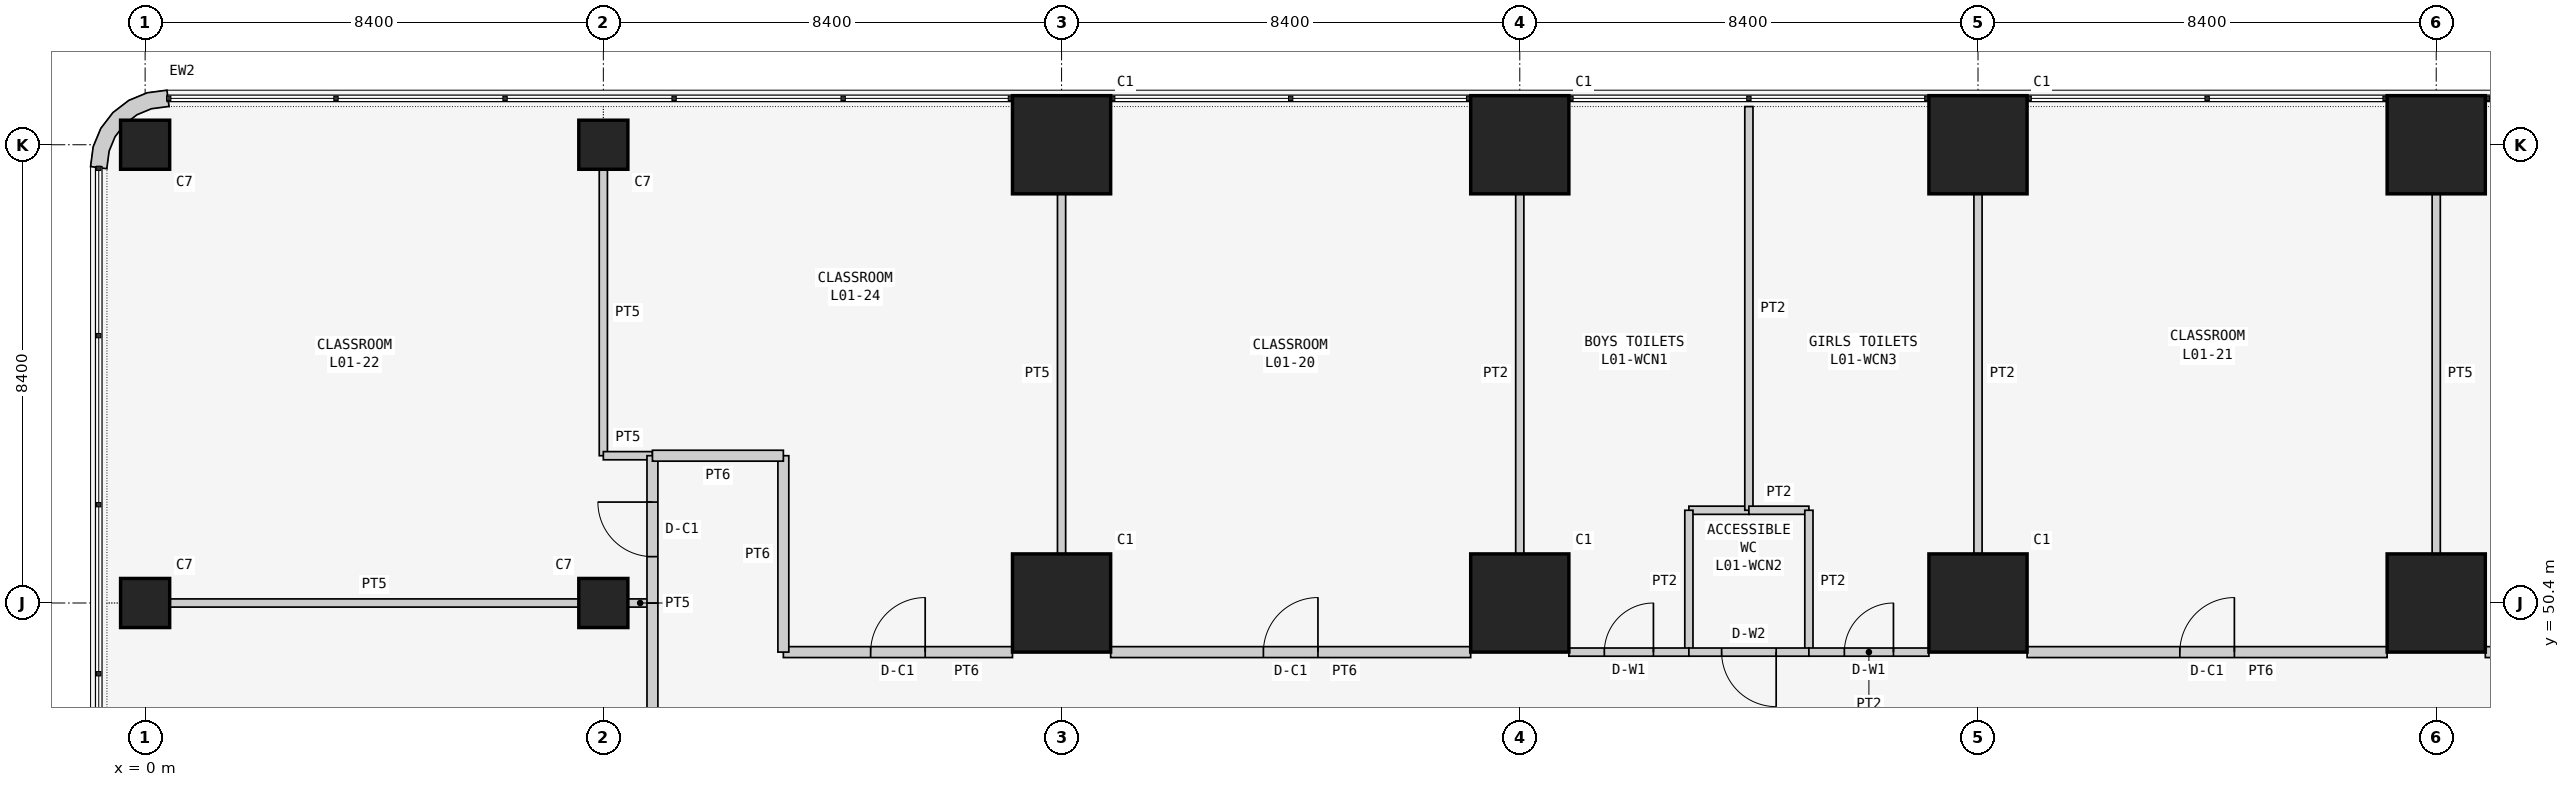
"""IFC4 building model, lengths in metres.
Left out: names, types, materials, properties, quantities, classifications, styles, units other than length and angle.
Written with IfcOpenShell. Run it as: python <this file> out.ifc"""

import sys

from ifc_helpers import new_model, si_unit, direction, frame, frame_2d, origin, origin_2d, place, context, subcontext, project, spatial, polyline, rectangle, outline, extrude, element, fill, save


model = new_model("IFC4")
c1 = context("Model", 3, precision=1e-05, world=origin(), true_north=direction((0.0, 1.0)))
c2 = subcontext(c1, "Body", "Model", "MODEL_VIEW")
j1 = project(units=[si_unit("LENGTHUNIT", "METRE"), si_unit("PLANEANGLEUNIT", "RADIAN")], contexts=[c1])
p1 = place(None, origin())
s1 = spatial("IfcSite", under=j1, at=p1, CompositionType="ELEMENT")
p2 = place(p1, origin())
s2 = spatial("IfcBuilding", under=s1, at=p2, CompositionType="ELEMENT")
p3 = place(p2, frame((0.0, 0.0, 6.0)))
s3 = spatial("IfcBuildingStorey", under=s2, at=p3, CompositionType="ELEMENT", Elevation=6.0)
for number, where, z_axis, x_axis in (
    (1, (0.0, 50.4, 0.0), (0.0, 0.0, 1.0), (1.0, 0.0, 0.0)),
    (2, (0.0, 58.8, 0.0), (0.0, 0.0, 1.0), (1.0, 0.0, 0.0)),
    (3, (8.4, 50.4, 0.0), (0.0, 0.0, 1.0), (1.0, 0.0, 0.0)),
    (4, (8.4, 58.8, 0.0), (0.0, 0.0, 1.0), (1.0, 0.0, 0.0)),
):
    element("IfcColumn", number, at=place(p3, frame(where, z_axis=z_axis, x_axis=x_axis)), inside=s3, PredefinedType="COLUMN", context=c2, shape_type="SweptSolid", body=[
        extrude(rectangle(XDim=0.9, YDim=0.9, at=origin_2d()), origin(), (0.0, 0.0, 1.0), 4.5),
    ])
for number, where, z_axis, x_axis in (
    (5, (16.8, 50.4, 0.0), (0.0, 0.0, 1.0), (1.0, 0.0, 0.0)),
    (6, (16.8, 58.8, 0.0), (0.0, 0.0, 1.0), (1.0, 0.0, 0.0)),
    (7, (25.2, 50.4, 0.0), (0.0, 0.0, 1.0), (1.0, 0.0, 0.0)),
    (8, (25.2, 58.8, 0.0), (0.0, 0.0, 1.0), (1.0, 0.0, 0.0)),
    (9, (33.6, 50.4, 0.0), (0.0, 0.0, 1.0), (1.0, 0.0, 0.0)),
    (10, (33.6, 58.8, 0.0), (0.0, 0.0, 1.0), (1.0, 0.0, 0.0)),
    (11, (42.0, 50.4, 0.0), (0.0, 0.0, 1.0), (1.0, 0.0, 0.0)),
    (12, (42.0, 58.8, 0.0), (0.0, 0.0, 1.0), (1.0, 0.0, 0.0)),
):
    element("IfcColumn", number, at=place(p3, frame(where, z_axis=z_axis, x_axis=x_axis)), inside=s3, PredefinedType="COLUMN", context=c2, shape_type="SweptSolid", body=[
        extrude(rectangle(XDim=1.8, YDim=1.8, at=origin_2d()), origin(), (0.0, 0.0, 1.0), 4.5),
    ])
p4 = place(p3, frame((0.445, 59.648, 0.0), z_axis=(0.0, 0.0, 1.0), x_axis=(-0.707106781187, 0.707106781187, 0.0)))
e13 = element("IfcWall", 13, at=p4, inside=s3, PredefinedType="SOLIDWALL", context=c2, shape_type="SweptSolid", body=[
    extrude(outline(polyline([(0.139, 1.904), (-0.101, 1.72), (-0.087, 1.706), (0.1, 1.463), (0.209, 1.198), (0.247, 0.914), (0.209, 0.63), (0.1, 0.365), (-0.087, 0.122), (-0.101, 0.108), (0.139, -0.076), (0.362, 0.214), (0.502, 0.552), (0.549, 0.914), (0.502, 1.276), (0.362, 1.614), (0.139, 1.904)])), origin(), (0.0, 0.0, 1.0), 4.3),
])
p5 = place(p3, frame((29.4, 52.1, 0.0), z_axis=(0.0, 0.0, 1.0), x_axis=(-1.0, 0.0, 0.0)))
e14 = element("IfcWall", 14, at=p5, inside=s3, PredefinedType="PARTITIONING", context=c2, shape_type="SweptSolid", body=[
    extrude(rectangle(XDim=1.1, YDim=0.15, at=frame_2d((0.55, 0.0))), origin(), (0.0, 0.0, 1.0), 4.3),
])
p6 = place(p3, frame((28.3, 52.1, 0.0), z_axis=(0.0, 0.0, 1.0), x_axis=(0.0, -1.0, 0.0)))
e15 = element("IfcWall", 15, at=p6, inside=s3, PredefinedType="PARTITIONING", context=c2, shape_type="SweptSolid", body=[
    extrude(rectangle(XDim=2.6, YDim=0.15, at=frame_2d((1.3, 0.0))), origin(), (0.0, 0.0, 1.0), 4.3),
])
p7 = place(p3, frame((29.4, 59.5, 0.0), z_axis=(0.0, 0.0, 1.0), x_axis=(0.0, -1.0, 0.0)))
e16 = element("IfcWall", 16, at=p7, inside=s3, PredefinedType="PARTITIONING", context=c2, shape_type="SweptSolid", body=[
    extrude(rectangle(XDim=7.4, YDim=0.15, at=frame_2d((3.7, 0.0))), origin(), (0.0, 0.0, 1.0), 3.688),
])
p8 = place(p3, frame((25.2, 51.3, 0.0), z_axis=(0.0, 0.0, 1.0), x_axis=(0.0, 1.0, 0.0)))
e17 = element("IfcWall", 17, at=p8, inside=s3, PredefinedType="PARTITIONING", context=c2, shape_type="SweptSolid", body=[
    extrude(rectangle(XDim=6.6, YDim=0.15, at=frame_2d((3.3, 0.0))), origin(), (0.0, 0.0, 1.0), 3.543),
])
p9 = place(p3, frame((28.3, 49.5, 0.0), z_axis=(0.0, 0.0, 1.0), x_axis=(-1.0, 0.0, 0.0)))
e18 = element("IfcWall", 18, at=p9, inside=s3, PredefinedType="PARTITIONING", context=c2, shape_type="SweptSolid", body=[
    extrude(rectangle(XDim=2.2, YDim=0.15, at=frame_2d((1.1, 0.0))), origin(), (0.0, 0.0, 1.0), 4.3),
])
p10 = place(p9, frame((0.65, 0.0, 0.0)))
e19 = element("IfcOpeningElement", 19, at=p10, cuts=e18, PredefinedType="OPENING", context=c2, shape_type="SweptSolid", body=[
    extrude(rectangle(XDim=0.9, YDim=2.1, at=frame_2d((0.45, 1.05))), frame((0.0, 0.085, 0.0), z_axis=(0.0, -1.0, 0.0), x_axis=(1.0, 0.0, 0.0)), (0.0, 0.0, 1.0), 0.17),
])
p11 = place(p3, frame((29.4, 52.1, 0.0), z_axis=(0.0, 0.0, 1.0), x_axis=(1.0, 0.0, 0.0)))
e20 = element("IfcWall", 20, at=p11, inside=s3, PredefinedType="PARTITIONING", context=c2, shape_type="SweptSolid", body=[
    extrude(rectangle(XDim=1.1, YDim=0.15, at=frame_2d((0.55, 0.0))), origin(), (0.0, 0.0, 1.0), 4.3),
])
p12 = place(p3, frame((30.5, 52.1, 0.0), z_axis=(0.0, 0.0, 1.0), x_axis=(0.0, -1.0, 0.0)))
e21 = element("IfcWall", 21, at=p12, inside=s3, PredefinedType="PARTITIONING", context=c2, shape_type="SweptSolid", body=[
    extrude(rectangle(XDim=2.6, YDim=0.15, at=frame_2d((1.3, 0.0))), origin(), (0.0, 0.0, 1.0), 4.3),
])
p13 = place(p3, frame((30.5, 49.5, 0.0), z_axis=(0.0, 0.0, 1.0), x_axis=(-1.0, 0.0, 0.0)))
e22 = element("IfcWall", 22, at=p13, inside=s3, PredefinedType="PARTITIONING", context=c2, shape_type="SweptSolid", body=[
    extrude(rectangle(XDim=2.2, YDim=0.15, at=frame_2d((1.1, 0.0))), origin(), (0.0, 0.0, 1.0), 4.3),
])
p14 = place(p13, frame((0.6, 0.0, 0.0)))
e23 = element("IfcOpeningElement", 23, at=p14, cuts=e22, PredefinedType="OPENING", context=c2, shape_type="SweptSolid", body=[
    extrude(rectangle(XDim=1.0, YDim=2.1, at=frame_2d((0.5, 1.05))), frame((0.0, 0.085, 0.0), z_axis=(0.0, -1.0, 0.0), x_axis=(1.0, 0.0, 0.0)), (0.0, 0.0, 1.0), 0.17),
])
p15 = place(p3, frame((33.6, 57.9, 0.0), z_axis=(0.0, 0.0, 1.0), x_axis=(0.0, -1.0, 0.0)))
e24 = element("IfcWall", 24, at=p15, inside=s3, PredefinedType="PARTITIONING", context=c2, shape_type="SweptSolid", body=[
    extrude(rectangle(XDim=6.6, YDim=0.15, at=frame_2d((3.3, 0.0))), origin(), (0.0, 0.0, 1.0), 3.543),
])
p16 = place(p3, frame((32.7, 49.5, 0.0), z_axis=(0.0, 0.0, 1.0), x_axis=(-1.0, 0.0, 0.0)))
e25 = element("IfcWall", 25, at=p16, inside=s3, PredefinedType="PARTITIONING", context=c2, shape_type="SweptSolid", body=[
    extrude(rectangle(XDim=2.2, YDim=0.15, at=frame_2d((1.1, 0.0))), origin(), (0.0, 0.0, 1.0), 4.3),
])
p17 = place(p16, frame((0.65, 0.0, 0.0)))
e26 = element("IfcOpeningElement", 26, at=p17, cuts=e25, PredefinedType="OPENING", context=c2, shape_type="SweptSolid", body=[
    extrude(rectangle(XDim=0.9, YDim=2.1, at=frame_2d((0.45, 1.05))), frame((0.0, 0.085, 0.0), z_axis=(0.0, -1.0, 0.0), x_axis=(1.0, 0.0, 0.0)), (0.0, 0.0, 1.0), 0.17),
])
p18 = place(p3, frame((0.45, 50.4, 0.0), z_axis=(0.0, 0.0, 1.0), x_axis=(1.0, 0.0, 0.0)))
e27 = element("IfcWall", 27, at=p18, inside=s3, PredefinedType="PARTITIONING", context=c2, shape_type="SweptSolid", body=[
    extrude(rectangle(XDim=7.5, YDim=0.15, at=frame_2d((3.75, 0.0))), origin(), (0.0, 0.0, 1.0), 3.543),
])
p19 = place(p3, frame((8.85, 50.4, 0.0), z_axis=(0.0, 0.0, 1.0), x_axis=(1.0, 0.0, 0.0)))
e28 = element("IfcWall", 28, at=p19, inside=s3, PredefinedType="PARTITIONING", context=c2, shape_type="SweptSolid", body=[
    extrude(rectangle(XDim=0.45, YDim=0.15, at=frame_2d((0.225, 0.0))), origin(), (0.0, 0.0, 1.0), 3.543),
])
p20 = place(p3, frame((9.3, 50.4, 0.0), z_axis=(0.0, 0.0, 1.0), x_axis=(0.0, -1.0, 0.0)))
e29 = element("IfcWall", 29, at=p20, inside=s3, PredefinedType="PARTITIONING", context=c2, shape_type="SweptSolid", body=[
    extrude(rectangle(XDim=7.5, YDim=0.2, at=frame_2d((3.75, 0.0))), origin(), (0.0, 0.0, 1.0), 4.3),
])
p21 = place(p20, frame((3.25, 0.0, 0.0)))
e30 = element("IfcOpeningElement", 30, at=p21, cuts=e29, PredefinedType="OPENING", context=c2, shape_type="SweptSolid", body=[
    extrude(rectangle(XDim=1.0, YDim=2.1, at=frame_2d((0.5, 1.05))), frame((0.0, 0.11, 0.0), z_axis=(0.0, -1.0, 0.0), x_axis=(1.0, 0.0, 0.0)), (0.0, 0.0, 1.0), 0.22),
])
p22 = place(p3, frame((16.8, 51.3, 0.0), z_axis=(0.0, 0.0, 1.0), x_axis=(0.0, 1.0, 0.0)))
e31 = element("IfcWall", 31, at=p22, inside=s3, PredefinedType="PARTITIONING", context=c2, shape_type="SweptSolid", body=[
    extrude(rectangle(XDim=6.6, YDim=0.15, at=frame_2d((3.3, 0.0))), origin(), (0.0, 0.0, 1.0), 3.543),
])
p23 = place(p3, frame((24.3, 49.5, 0.0), z_axis=(0.0, 0.0, 1.0), x_axis=(-1.0, 0.0, 0.0)))
e32 = element("IfcWall", 32, at=p23, inside=s3, PredefinedType="PARTITIONING", context=c2, shape_type="SweptSolid", body=[
    extrude(rectangle(XDim=6.6, YDim=0.2, at=frame_2d((3.3, 0.0))), origin(), (0.0, 0.0, 1.0), 4.3),
])
p24 = place(p23, frame((2.8, 0.0, 0.0)))
e33 = element("IfcOpeningElement", 33, at=p24, cuts=e32, PredefinedType="OPENING", context=c2, shape_type="SweptSolid", body=[
    extrude(rectangle(XDim=1.0, YDim=2.1, at=frame_2d((0.5, 1.05))), frame((0.0, 0.11, 0.0), z_axis=(0.0, -1.0, 0.0), x_axis=(1.0, 0.0, 0.0)), (0.0, 0.0, 1.0), 0.22),
])
p25 = place(p3, frame((42.0, 57.9, 0.0), z_axis=(0.0, 0.0, 1.0), x_axis=(0.0, -1.0, 0.0)))
e34 = element("IfcWall", 34, at=p25, inside=s3, PredefinedType="PARTITIONING", context=c2, shape_type="SweptSolid", body=[
    extrude(rectangle(XDim=6.6, YDim=0.15, at=frame_2d((3.3, 0.0))), origin(), (0.0, 0.0, 1.0), 3.543),
])
p26 = place(p3, frame((41.1, 49.5, 0.0), z_axis=(0.0, 0.0, 1.0), x_axis=(-1.0, 0.0, 0.0)))
e35 = element("IfcWall", 35, at=p26, inside=s3, PredefinedType="PARTITIONING", context=c2, shape_type="SweptSolid", body=[
    extrude(rectangle(XDim=6.6, YDim=0.2, at=frame_2d((3.3, 0.0))), origin(), (0.0, 0.0, 1.0), 4.3),
])
p27 = place(p26, frame((2.8, 0.0, 0.0)))
e36 = element("IfcOpeningElement", 36, at=p27, cuts=e35, PredefinedType="OPENING", context=c2, shape_type="SweptSolid", body=[
    extrude(rectangle(XDim=1.0, YDim=2.1, at=frame_2d((0.5, 1.05))), frame((0.0, 0.11, 0.0), z_axis=(0.0, -1.0, 0.0), x_axis=(1.0, 0.0, 0.0)), (0.0, 0.0, 1.0), 0.22),
])
p28 = place(p3, frame((8.4, 58.35, 0.0), z_axis=(0.0, 0.0, 1.0), x_axis=(0.0, -1.0, 0.0)))
e37 = element("IfcWall", 37, at=p28, inside=s3, PredefinedType="PARTITIONING", context=c2, shape_type="SweptSolid", body=[
    extrude(rectangle(XDim=5.25, YDim=0.15, at=frame_2d((2.625, 0.0))), origin(), (0.0, 0.0, 1.0), 3.543),
])
p29 = place(p3, frame((8.4, 53.1, 0.0), z_axis=(0.0, 0.0, 1.0), x_axis=(1.0, 0.0, 0.0)))
e38 = element("IfcWall", 38, at=p29, inside=s3, PredefinedType="PARTITIONING", context=c2, shape_type="SweptSolid", body=[
    extrude(rectangle(XDim=0.9, YDim=0.15, at=frame_2d((0.45, 0.0))), origin(), (0.0, 0.0, 1.0), 4.3),
])
p30 = place(p3, frame((9.3, 53.1, 0.0), z_axis=(0.0, 0.0, 1.0), x_axis=(0.0, -1.0, 0.0)))
e39 = element("IfcWall", 39, at=p30, inside=s3, PredefinedType="PARTITIONING", context=c2, shape_type="SweptSolid", body=[
    extrude(rectangle(XDim=2.7, YDim=0.2, at=frame_2d((1.35, 0.0))), origin(), (0.0, 0.0, 1.0), 4.3),
])
p31 = place(p30, frame((0.85, 0.0, 0.0)))
e40 = element("IfcOpeningElement", 40, at=p31, cuts=e39, PredefinedType="OPENING", context=c2, shape_type="SweptSolid", body=[
    extrude(rectangle(XDim=1.0, YDim=2.1, at=frame_2d((0.5, 1.05))), frame((0.0, 0.11, 0.0), z_axis=(0.0, -1.0, 0.0), x_axis=(1.0, 0.0, 0.0)), (0.0, 0.0, 1.0), 0.22),
])
p32 = place(p3, frame((15.9, 49.5, 0.0), z_axis=(0.0, 0.0, 1.0), x_axis=(-1.0, 0.0, 0.0)))
e41 = element("IfcWall", 41, at=p32, inside=s3, PredefinedType="PARTITIONING", context=c2, shape_type="SweptSolid", body=[
    extrude(rectangle(XDim=4.2, YDim=0.2, at=frame_2d((2.1, 0.0))), origin(), (0.0, 0.0, 1.0), 4.3),
])
p33 = place(p32, frame((1.6, 0.0, 0.0)))
e42 = element("IfcOpeningElement", 42, at=p33, cuts=e41, PredefinedType="OPENING", context=c2, shape_type="SweptSolid", body=[
    extrude(rectangle(XDim=1.0, YDim=2.1, at=frame_2d((0.5, 1.05))), frame((0.0, 0.11, 0.0), z_axis=(0.0, -1.0, 0.0), x_axis=(1.0, 0.0, 0.0)), (0.0, 0.0, 1.0), 0.22),
])
p34 = place(p3, frame((11.7, 49.5, 0.0), z_axis=(0.0, 0.0, 1.0), x_axis=(0.0, 1.0, 0.0)))
e43 = element("IfcWall", 43, at=p34, inside=s3, PredefinedType="PARTITIONING", context=c2, shape_type="SweptSolid", body=[
    extrude(rectangle(XDim=3.6, YDim=0.2, at=frame_2d((1.8, 0.0))), origin(), (0.0, 0.0, 1.0), 4.3),
])
p35 = place(p3, frame((11.7, 53.1, 0.0), z_axis=(0.0, 0.0, 1.0), x_axis=(-1.0, 0.0, 0.0)))
e44 = element("IfcWall", 44, at=p35, inside=s3, PredefinedType="PARTITIONING", context=c2, shape_type="SweptSolid", body=[
    extrude(rectangle(XDim=2.4, YDim=0.2, at=frame_2d((1.2, 0.0))), origin(), (0.0, 0.0, 1.0), 4.3),
])
p36 = place(p3, frame((47.1, 49.5, 0.0), z_axis=(0.0, 0.0, 1.0), x_axis=(-1.0, 0.0, 0.0)))
e45 = element("IfcWall", 45, at=p36, inside=s3, PredefinedType="PARTITIONING", context=c2, shape_type="SweptSolid", body=[
    extrude(rectangle(XDim=4.2, YDim=0.2, at=frame_2d((2.1, 0.0))), origin(), (0.0, 0.0, 1.0), 4.3),
])
p37 = place(p36, frame((1.6, 0.0, 0.0)))
e46 = element("IfcOpeningElement", 46, at=p37, cuts=e45, PredefinedType="OPENING", context=c2, shape_type="SweptSolid", body=[
    extrude(rectangle(XDim=1.0, YDim=2.1, at=frame_2d((0.5, 1.05))), frame((0.0, 0.11, 0.0), z_axis=(0.0, -1.0, 0.0), x_axis=(1.0, 0.0, 0.0)), (0.0, 0.0, 1.0), 0.22),
])
p38 = place(p10, frame((0.9, 0.0, 0.0), z_axis=(0.0, 0.0, 1.0), x_axis=(-1.0, 0.0, 0.0)))
e47 = element("IfcDoor", 47, at=p38, inside=s3, OperationType="SINGLE_SWING_RIGHT", PredefinedType="DOOR", context=c2, shape_type="SweptSolid", body=[
    extrude(rectangle(XDim=0.9, YDim=2.1, at=frame_2d((0.45, 1.05))), frame((0.0, 0.025, 0.0), z_axis=(0.0, -1.0, 0.0), x_axis=(1.0, 0.0, 0.0)), (0.0, 0.0, 1.0), 0.05),
])
fill(e19, e47)
p39 = place(p14, origin())
e48 = element("IfcDoor", 48, at=p39, inside=s3, OperationType="SINGLE_SWING_LEFT", PredefinedType="DOOR", context=c2, shape_type="SweptSolid", body=[
    extrude(rectangle(XDim=1.0, YDim=2.1, at=frame_2d((0.5, 1.05))), frame((0.0, 0.025, 0.0), z_axis=(0.0, -1.0, 0.0), x_axis=(1.0, 0.0, 0.0)), (0.0, 0.0, 1.0), 0.05),
])
fill(e23, e48)
p40 = place(p17, frame((0.9, 0.0, 0.0), z_axis=(0.0, 0.0, 1.0), x_axis=(-1.0, 0.0, 0.0)))
e49 = element("IfcDoor", 49, at=p40, inside=s3, OperationType="SINGLE_SWING_RIGHT", PredefinedType="DOOR", context=c2, shape_type="SweptSolid", body=[
    extrude(rectangle(XDim=0.9, YDim=2.1, at=frame_2d((0.45, 1.05))), frame((0.0, 0.025, 0.0), z_axis=(0.0, -1.0, 0.0), x_axis=(1.0, 0.0, 0.0)), (0.0, 0.0, 1.0), 0.05),
])
fill(e26, e49)
p41 = place(p24, frame((1.0, 0.0, 0.0), z_axis=(0.0, 0.0, 1.0), x_axis=(-1.0, 0.0, 0.0)))
e50 = element("IfcDoor", 50, at=p41, inside=s3, OperationType="SINGLE_SWING_RIGHT", PredefinedType="DOOR", context=c2, shape_type="SweptSolid", body=[
    extrude(rectangle(XDim=1.0, YDim=2.1, at=frame_2d((0.5, 1.05))), frame((0.0, 0.025, 0.0), z_axis=(0.0, -1.0, 0.0), x_axis=(1.0, 0.0, 0.0)), (0.0, 0.0, 1.0), 0.05),
])
fill(e33, e50)
p42 = place(p27, frame((1.0, 0.0, 0.0), z_axis=(0.0, 0.0, 1.0), x_axis=(-1.0, 0.0, 0.0)))
e51 = element("IfcDoor", 51, at=p42, inside=s3, OperationType="SINGLE_SWING_RIGHT", PredefinedType="DOOR", context=c2, shape_type="SweptSolid", body=[
    extrude(rectangle(XDim=1.0, YDim=2.1, at=frame_2d((0.5, 1.05))), frame((0.0, 0.025, 0.0), z_axis=(0.0, -1.0, 0.0), x_axis=(1.0, 0.0, 0.0)), (0.0, 0.0, 1.0), 0.05),
])
fill(e36, e51)
p43 = place(p31, frame((1.0, 0.0, 0.0), z_axis=(0.0, 0.0, 1.0), x_axis=(-1.0, 0.0, 0.0)))
e52 = element("IfcDoor", 52, at=p43, inside=s3, OperationType="SINGLE_SWING_RIGHT", PredefinedType="DOOR", context=c2, shape_type="SweptSolid", body=[
    extrude(rectangle(XDim=1.0, YDim=2.1, at=frame_2d((0.5, 1.05))), frame((0.0, 0.025, 0.0), z_axis=(0.0, -1.0, 0.0), x_axis=(1.0, 0.0, 0.0)), (0.0, 0.0, 1.0), 0.05),
])
fill(e40, e52)
p44 = place(p33, frame((1.0, 0.0, 0.0), z_axis=(0.0, 0.0, 1.0), x_axis=(-1.0, 0.0, 0.0)))
e53 = element("IfcDoor", 53, at=p44, inside=s3, OperationType="SINGLE_SWING_RIGHT", PredefinedType="DOOR", context=c2, shape_type="SweptSolid", body=[
    extrude(rectangle(XDim=1.0, YDim=2.1, at=frame_2d((0.5, 1.05))), frame((0.0, 0.025, 0.0), z_axis=(0.0, -1.0, 0.0), x_axis=(1.0, 0.0, 0.0)), (0.0, 0.0, 1.0), 0.05),
])
fill(e42, e53)
save(model, sys.argv[1])
